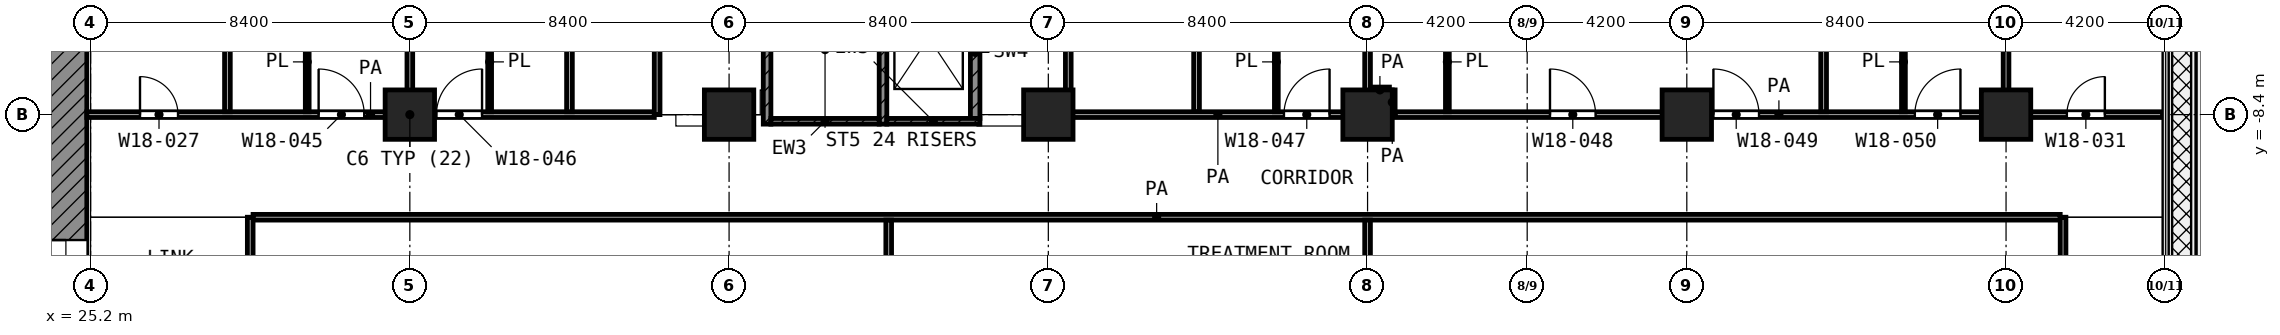
"""IFC4 building model, lengths in metres.
Left out: names, types, materials, properties, quantities, classifications, styles, units other than length and angle.
Written with IfcOpenShell. Run it as: python <this file> out.ifc"""

import sys

from ifc_helpers import new_model, si_unit, direction, frame, frame_2d, origin, origin_2d, place, context, subcontext, project, spatial, rectangle, extrude, element, fill, save


model = new_model("IFC4")
c1 = context("Model", 3, precision=1e-05, world=origin(), true_north=direction((0.0, 1.0)))
c2 = subcontext(c1, "Body", "Model", "MODEL_VIEW")
j1 = project(units=[si_unit("LENGTHUNIT", "METRE"), si_unit("PLANEANGLEUNIT", "RADIAN")], contexts=[c1])
p1 = place(None, origin())
s1 = spatial("IfcSite", under=j1, at=p1, CompositionType="ELEMENT")
p2 = place(p1, origin())
s2 = spatial("IfcBuilding", under=s1, at=p2, CompositionType="ELEMENT")
p3 = place(p2, frame((0.0, 0.0, 81.2)))
s3 = spatial("IfcBuildingStorey", under=s2, at=p3, CompositionType="ELEMENT", Elevation=81.2)
for number, where, z_axis, x_axis in (
    (1, (33.6, -8.4, 0.0), (0.0, 0.0, 1.0), (1.0, 0.0, 0.0)),
    (2, (42.0, -8.4, 0.0), (0.0, 0.0, 1.0), (1.0, 0.0, 0.0)),
    (3, (50.4, -8.4, 0.0), (0.0, 0.0, 1.0), (1.0, 0.0, 0.0)),
    (4, (58.8, -8.4, 0.0), (0.0, 0.0, 1.0), (1.0, 0.0, 0.0)),
    (5, (67.2, -8.4, 0.0), (0.0, 0.0, 1.0), (1.0, 0.0, 0.0)),
    (6, (75.6, -8.4, 0.0), (0.0, 0.0, 1.0), (1.0, 0.0, 0.0)),
):
    element("IfcColumn", number, at=place(p3, frame(where, z_axis=z_axis, x_axis=x_axis)), inside=s3, PredefinedType="COLUMN", context=c2, shape_type="SweptSolid", body=[
        extrude(rectangle(XDim=1.3, YDim=1.3, at=origin_2d()), origin(), (0.0, 0.0, 1.0), 4.2),
    ])
p4 = place(p3, frame((24.55, -24.0, 0.0), z_axis=(0.0, 0.0, 1.0), x_axis=(0.0, 1.0, 0.0)))
e7 = element("IfcWall", 7, at=p4, inside=s3, PredefinedType="SHEAR", context=c2, shape_type="SweptSolid", body=[
    extrude(rectangle(XDim=18.6, YDim=1.1, at=frame_2d((9.3, 0.0))), origin(), (0.0, 0.0, 1.0), 3.9),
])
p5 = place(p4, frame((10.5, 0.0, 0.0)))
e8 = element("IfcOpeningElement", 8, at=p5, cuts=e7, PredefinedType="OPENING", context=c2, shape_type="SweptSolid", body=[
    extrude(rectangle(XDim=1.8, YDim=2.1, at=frame_2d((0.9, 1.05))), frame((0.0, 0.56, 0.0), z_axis=(0.0, -1.0, 0.0), x_axis=(1.0, 0.0, 0.0)), (0.0, 0.0, 1.0), 1.12),
])
p6 = place(p3, frame((43.0, -8.65, 0.0), z_axis=(0.0, 0.0, 1.0), x_axis=(0.0, 1.0, 0.0)))
e9 = element("IfcWall", 9, at=p6, inside=s3, PredefinedType="SHEAR", context=c2, shape_type="SweptSolid", body=[
    extrude(rectangle(XDim=8.35, YDim=0.2, at=frame_2d((4.175, 0.0))), origin(), (0.0, 0.0, 1.0), 3.9),
])
p7 = place(p6, frame((7.0, 0.0, 0.0)))
e10 = element("IfcOpeningElement", 10, at=p7, cuts=e9, PredefinedType="OPENING", context=c2, shape_type="SweptSolid", body=[
    extrude(rectangle(XDim=1.1, YDim=2.1, at=frame_2d((0.55, 1.05))), frame((0.0, 0.11, 0.0), z_axis=(0.0, -1.0, 0.0), x_axis=(1.0, 0.0, 0.0)), (0.0, 0.0, 1.0), 0.22),
])
p8 = place(p3, frame((46.05, -8.65, 0.0), z_axis=(0.0, 0.0, 1.0), x_axis=(0.0, 1.0, 0.0)))
e11 = element("IfcWall", 11, at=p8, inside=s3, PredefinedType="SHEAR", context=c2, shape_type="SweptSolid", body=[
    extrude(rectangle(XDim=8.35, YDim=0.2, at=frame_2d((4.175, 0.0))), origin(), (0.0, 0.0, 1.0), 3.9),
])
p9 = place(p8, frame((7.0, 0.0, 0.0)))
e12 = element("IfcOpeningElement", 12, at=p9, cuts=e11, PredefinedType="OPENING", context=c2, shape_type="SweptSolid", body=[
    extrude(rectangle(XDim=1.1, YDim=2.1, at=frame_2d((0.55, 1.05))), frame((0.0, 0.11, 0.0), z_axis=(0.0, -1.0, 0.0), x_axis=(1.0, 0.0, 0.0)), (0.0, 0.0, 1.0), 0.22),
])
p10 = place(p3, frame((43.1, -8.575, 0.0), z_axis=(0.0, 0.0, 1.0), x_axis=(1.0, 0.0, 0.0)))
e13 = element("IfcWall", 13, at=p10, inside=s3, PredefinedType="SHEAR", context=c2, shape_type="SweptSolid", body=[
    extrude(rectangle(XDim=2.85, YDim=0.15, at=frame_2d((1.425, 0.0))), origin(), (0.0, 0.0, 1.0), 3.9),
])
p11 = place(p3, frame((46.15, -8.575, 0.0), z_axis=(0.0, 0.0, 1.0), x_axis=(1.0, 0.0, 0.0)))
e14 = element("IfcWall", 14, at=p11, inside=s3, PredefinedType="SHEAR", context=c2, shape_type="SweptSolid", body=[
    extrude(rectangle(XDim=2.45, YDim=0.15, at=frame_2d((1.225, 0.0))), origin(), (0.0, 0.0, 1.0), 3.9),
])
p12 = place(p3, frame((48.475, -8.5, 0.0), z_axis=(0.0, 0.0, 1.0), x_axis=(0.0, 1.0, 0.0)))
e15 = element("IfcWall", 15, at=p12, inside=s3, PredefinedType="SHEAR", context=c2, shape_type="SweptSolid", body=[
    extrude(rectangle(XDim=3.475, YDim=0.25, at=frame_2d((1.738, 0.0))), origin(), (0.0, 0.0, 1.0), 3.9),
])
for number, where, z_axis, x_axis in (
    (16, (30.9, -8.325, 0.0), (0.0, 0.0, 1.0), (0.0, 1.0, 0.0)),
    (17, (35.7, -8.325, 0.0), (0.0, 0.0, 1.0), (0.0, 1.0, 0.0)),
    (18, (56.4, -8.325, 0.0), (0.0, 0.0, 1.0), (0.0, 1.0, 0.0)),
):
    element("IfcWall", number, at=place(p3, frame(where, z_axis=z_axis, x_axis=x_axis)), inside=s3, PredefinedType="PARTITIONING", context=c2, shape_type="SweptSolid", body=[
        extrude(rectangle(XDim=2.625, YDim=0.1, at=frame_2d((1.312, 0.0))), origin(), (0.0, 0.0, 1.0), 3.9),
    ])
p13 = place(p3, frame((60.9, -8.325, 0.0), z_axis=(0.0, 0.0, 1.0), x_axis=(0.0, 1.0, 0.0)))
e19 = element("IfcWall", 19, at=p13, inside=s3, PredefinedType="PARTITIONING", context=c2, shape_type="SweptSolid", body=[
    extrude(rectangle(XDim=2.624, YDim=0.1, at=frame_2d((1.312, 0.0))), origin(), (0.0, 0.0, 1.0), 3.9),
])
p14 = place(p3, frame((72.9, -8.325, 0.0), z_axis=(0.0, 0.0, 1.0), x_axis=(0.0, 1.0, 0.0)))
e20 = element("IfcWall", 20, at=p14, inside=s3, PredefinedType="PARTITIONING", context=c2, shape_type="SweptSolid", body=[
    extrude(rectangle(XDim=2.625, YDim=0.1, at=frame_2d((1.312, 0.0))), origin(), (0.0, 0.0, 1.0), 3.9),
])
p15 = place(p3, frame((29.475, -11.1, 0.0), z_axis=(0.0, 0.0, 1.0), x_axis=(1.0, 0.0, 0.0)))
e21 = element("IfcWall", 21, at=p15, inside=s3, PredefinedType="PARTITIONING", context=c2, shape_type="SweptSolid", body=[
    extrude(rectangle(XDim=47.55, YDim=0.15, at=frame_2d((23.775, 0.0))), origin(), (0.0, 0.0, 1.0), 3.9),
])
p16 = place(p3, frame((25.1, -8.4, 0.0), z_axis=(0.0, 0.0, 1.0), x_axis=(1.0, 0.0, 0.0)))
e22 = element("IfcWall", 22, at=p16, inside=s3, PredefinedType="PARTITIONING", context=c2, shape_type="SweptSolid", body=[
    extrude(rectangle(XDim=14.932, YDim=0.15, at=frame_2d((7.466, 0.0))), origin(), (0.0, 0.0, 1.0), 3.9),
])
p17 = place(p16, frame((1.4, 0.0, 0.0)))
e23 = element("IfcOpeningElement", 23, at=p17, cuts=e22, PredefinedType="OPENING", context=c2, shape_type="SweptSolid", body=[
    extrude(rectangle(XDim=1.0, YDim=2.1, at=frame_2d((0.5, 1.05))), frame((0.0, 0.085, 0.0), z_axis=(0.0, -1.0, 0.0), x_axis=(1.0, 0.0, 0.0)), (0.0, 0.0, 1.0), 0.17),
])
p18 = place(p16, frame((6.1, 0.0, 0.0)))
e24 = element("IfcOpeningElement", 24, at=p18, cuts=e22, PredefinedType="OPENING", context=c2, shape_type="SweptSolid", body=[
    extrude(rectangle(XDim=1.2, YDim=2.1, at=frame_2d((0.6, 1.05))), frame((0.0, 0.085, 0.0), z_axis=(0.0, -1.0, 0.0), x_axis=(1.0, 0.0, 0.0)), (0.0, 0.0, 1.0), 0.17),
])
p19 = place(p16, frame((9.2, 0.0, 0.0)))
e25 = element("IfcOpeningElement", 25, at=p19, cuts=e22, PredefinedType="OPENING", context=c2, shape_type="SweptSolid", body=[
    extrude(rectangle(XDim=1.2, YDim=2.1, at=frame_2d((0.6, 1.05))), frame((0.0, 0.085, 0.0), z_axis=(0.0, -1.0, 0.0), x_axis=(1.0, 0.0, 0.0)), (0.0, 0.0, 1.0), 0.17),
])
p20 = place(p3, frame((51.0, -8.4, 0.0), z_axis=(0.0, 0.0, 1.0), x_axis=(1.0, 0.0, 0.0)))
e26 = element("IfcWall", 26, at=p20, inside=s3, PredefinedType="PARTITIONING", context=c2, shape_type="SweptSolid", body=[
    extrude(rectangle(XDim=7.723, YDim=0.15, at=frame_2d((3.861, 0.0))), origin(), (0.0, 0.0, 1.0), 3.9),
])
p21 = place(p20, frame((5.6, 0.0, 0.0)))
e27 = element("IfcOpeningElement", 27, at=p21, cuts=e26, PredefinedType="OPENING", context=c2, shape_type="SweptSolid", body=[
    extrude(rectangle(XDim=1.2, YDim=2.1, at=frame_2d((0.6, 1.05))), frame((0.0, 0.085, 0.0), z_axis=(0.0, -1.0, 0.0), x_axis=(1.0, 0.0, 0.0)), (0.0, 0.0, 1.0), 0.17),
])
p22 = place(p3, frame((59.527, -8.4, 0.0), z_axis=(0.0, 0.0, 1.0), x_axis=(1.0, 0.0, 0.0)))
e28 = element("IfcWall", 28, at=p22, inside=s3, PredefinedType="PARTITIONING", context=c2, shape_type="SweptSolid", body=[
    extrude(rectangle(XDim=20.193, YDim=0.15, at=frame_2d((10.096, 0.0))), origin(), (0.0, 0.0, 1.0), 3.9),
])
p23 = place(p22, frame((4.073, 0.0, 0.0)))
e29 = element("IfcOpeningElement", 29, at=p23, cuts=e28, PredefinedType="OPENING", context=c2, shape_type="SweptSolid", body=[
    extrude(rectangle(XDim=1.2, YDim=2.1, at=frame_2d((0.6, 1.05))), frame((0.0, 0.085, 0.0), z_axis=(0.0, -1.0, 0.0), x_axis=(1.0, 0.0, 0.0)), (0.0, 0.0, 1.0), 0.17),
])
p24 = place(p22, frame((8.373, 0.0, 0.0)))
e30 = element("IfcOpeningElement", 30, at=p24, cuts=e28, PredefinedType="OPENING", context=c2, shape_type="SweptSolid", body=[
    extrude(rectangle(XDim=1.2, YDim=2.1, at=frame_2d((0.6, 1.05))), frame((0.0, 0.085, 0.0), z_axis=(0.0, -1.0, 0.0), x_axis=(1.0, 0.0, 0.0)), (0.0, 0.0, 1.0), 0.17),
])
p25 = place(p22, frame((13.673, 0.0, 0.0)))
e31 = element("IfcOpeningElement", 31, at=p25, cuts=e28, PredefinedType="OPENING", context=c2, shape_type="SweptSolid", body=[
    extrude(rectangle(XDim=1.2, YDim=2.1, at=frame_2d((0.6, 1.05))), frame((0.0, 0.085, 0.0), z_axis=(0.0, -1.0, 0.0), x_axis=(1.0, 0.0, 0.0)), (0.0, 0.0, 1.0), 0.17),
])
p26 = place(p22, frame((17.673, 0.0, 0.0)))
e32 = element("IfcOpeningElement", 32, at=p26, cuts=e28, PredefinedType="OPENING", context=c2, shape_type="SweptSolid", body=[
    extrude(rectangle(XDim=1.0, YDim=2.1, at=frame_2d((0.5, 1.05))), frame((0.0, 0.085, 0.0), z_axis=(0.0, -1.0, 0.0), x_axis=(1.0, 0.0, 0.0)), (0.0, 0.0, 1.0), 0.17),
])
p27 = place(p3, frame((58.875, -7.75, 0.0), z_axis=(0.0, 0.0, 1.0), x_axis=(1.0, 0.0, 0.0)))
e33 = element("IfcWall", 33, at=p27, inside=s3, PredefinedType="PARTITIONING", context=c2, shape_type="SweptSolid", body=[
    extrude(rectangle(XDim=0.5, YDim=0.15, at=frame_2d((0.25, 0.0))), origin(), (0.0, 0.0, 1.0), 3.9),
])
p28 = place(p3, frame((28.8, -8.325, 0.0), z_axis=(0.0, 0.0, 1.0), x_axis=(0.0, 1.0, 0.0)))
e34 = element("IfcWall", 34, at=p28, inside=s3, PredefinedType="PARTITIONING", context=c2, shape_type="SweptSolid", body=[
    extrude(rectangle(XDim=8.245, YDim=0.15, at=frame_2d((4.123, 0.0))), origin(), (0.0, 0.0, 1.0), 3.9),
])
p29 = place(p3, frame((29.4, -14.1, 0.0), z_axis=(0.0, 0.0, 1.0), x_axis=(0.0, 1.0, 0.0)))
e35 = element("IfcWall", 35, at=p29, inside=s3, PredefinedType="PARTITIONING", context=c2, shape_type="SweptSolid", body=[
    extrude(rectangle(XDim=3.0, YDim=0.15, at=frame_2d((1.5, 0.0))), origin(), (0.0, 0.0, 1.0), 3.9),
])
for number, where, z_axis, x_axis in (
    (36, (33.6, -8.325, 0.0), (0.0, 0.0, 1.0), (0.0, 1.0, 0.0)),
    (37, (37.8, -8.325, 0.0), (0.0, 0.0, 1.0), (0.0, 1.0, 0.0)),
):
    element("IfcWall", number, at=place(p3, frame(where, z_axis=z_axis, x_axis=x_axis)), inside=s3, PredefinedType="PARTITIONING", context=c2, shape_type="SweptSolid", body=[
        extrude(rectangle(XDim=8.245, YDim=0.15, at=frame_2d((4.123, 0.0))), origin(), (0.0, 0.0, 1.0), 3.9),
    ])
p30 = place(p3, frame((40.107, -8.4, 0.0), z_axis=(0.0, 0.0, 1.0), x_axis=(0.0, 1.0, 0.0)))
e38 = element("IfcWall", 38, at=p30, inside=s3, PredefinedType="PARTITIONING", context=c2, shape_type="SweptSolid", body=[
    extrude(rectangle(XDim=8.048, YDim=0.15, at=frame_2d((4.024, 0.0))), origin(), (0.0, 0.0, 1.0), 3.9),
])
p31 = place(p30, frame((3.524, 0.0, 0.0)))
e39 = element("IfcOpeningElement", 39, at=p31, cuts=e38, PredefinedType="OPENING", context=c2, shape_type="SweptSolid", body=[
    extrude(rectangle(XDim=1.0, YDim=2.1, at=frame_2d((0.5, 1.05))), frame((0.0, 0.085, 0.0), z_axis=(0.0, -1.0, 0.0), x_axis=(1.0, 0.0, 0.0)), (0.0, 0.0, 1.0), 0.17),
])
p32 = place(p3, frame((46.2, -14.025, 0.0), z_axis=(0.0, 0.0, 1.0), x_axis=(0.0, 1.0, 0.0)))
e40 = element("IfcWall", 40, at=p32, inside=s3, PredefinedType="PARTITIONING", context=c2, shape_type="SweptSolid", body=[
    extrude(rectangle(XDim=2.85, YDim=0.15, at=frame_2d((1.425, 0.0))), origin(), (0.0, 0.0, 1.0), 3.9),
])
p33 = place(p3, frame((50.925, -8.4, 0.0), z_axis=(0.0, 0.0, 1.0), x_axis=(0.0, 1.0, 0.0)))
e41 = element("IfcWall", 41, at=p33, inside=s3, PredefinedType="PARTITIONING", context=c2, shape_type="SweptSolid", body=[
    extrude(rectangle(XDim=6.548, YDim=0.15, at=frame_2d((3.274, 0.0))), origin(), (0.0, 0.0, 1.0), 3.9),
])
p34 = place(p33, frame((2.774, 0.0, 0.0)))
e42 = element("IfcOpeningElement", 42, at=p34, cuts=e41, PredefinedType="OPENING", context=c2, shape_type="SweptSolid", body=[
    extrude(rectangle(XDim=1.0, YDim=2.1, at=frame_2d((0.5, 1.05))), frame((0.0, 0.085, 0.0), z_axis=(0.0, -1.0, 0.0), x_axis=(1.0, 0.0, 0.0)), (0.0, 0.0, 1.0), 0.17),
])
p35 = place(p3, frame((54.3, -8.325, 0.0), z_axis=(0.0, 0.0, 1.0), x_axis=(0.0, 1.0, 0.0)))
e43 = element("IfcWall", 43, at=p35, inside=s3, PredefinedType="PARTITIONING", context=c2, shape_type="SweptSolid", body=[
    extrude(rectangle(XDim=8.245, YDim=0.15, at=frame_2d((4.123, 0.0))), origin(), (0.0, 0.0, 1.0), 3.9),
])
p36 = place(p3, frame((58.8, -14.025, 0.0), z_axis=(0.0, 0.0, 1.0), x_axis=(0.0, 1.0, 0.0)))
e44 = element("IfcWall", 44, at=p36, inside=s3, PredefinedType="PARTITIONING", context=c2, shape_type="SweptSolid", body=[
    extrude(rectangle(XDim=2.85, YDim=0.15, at=frame_2d((1.425, 0.0))), origin(), (0.0, 0.0, 1.0), 3.9),
])
p37 = place(p3, frame((58.8, -8.398, 0.0), z_axis=(0.0, 0.0, 1.0), x_axis=(0.0, 1.0, 0.0)))
e45 = element("IfcWall", 45, at=p37, inside=s3, PredefinedType="PARTITIONING", context=c2, shape_type="SweptSolid", body=[
    extrude(rectangle(XDim=8.318, YDim=0.15, at=frame_2d((4.159, 0.0))), origin(), (0.0, 0.0, 1.0), 3.9),
])
p38 = place(p3, frame((59.45, -8.398, 0.0), z_axis=(0.0, 0.0, 1.0), x_axis=(0.0, 1.0, 0.0)))
e46 = element("IfcWall", 46, at=p38, inside=s3, PredefinedType="PARTITIONING", context=c2, shape_type="SweptSolid", body=[
    extrude(rectangle(XDim=0.648, YDim=0.15, at=frame_2d((0.324, 0.0))), origin(), (0.0, 0.0, 1.0), 3.9),
])
p39 = place(p3, frame((70.8, -8.325, 0.0), z_axis=(0.0, 0.0, 1.0), x_axis=(0.0, 1.0, 0.0)))
e47 = element("IfcWall", 47, at=p39, inside=s3, PredefinedType="PARTITIONING", context=c2, shape_type="SweptSolid", body=[
    extrude(rectangle(XDim=8.245, YDim=0.15, at=frame_2d((4.123, 0.0))), origin(), (0.0, 0.0, 1.0), 3.9),
])
p40 = place(p3, frame((75.6, -8.325, 0.0), z_axis=(0.0, 0.0, 1.0), x_axis=(0.0, 1.0, 0.0)))
e48 = element("IfcWall", 48, at=p40, inside=s3, PredefinedType="PARTITIONING", context=c2, shape_type="SweptSolid", body=[
    extrude(rectangle(XDim=6.412, YDim=0.15, at=frame_2d((3.206, 0.0))), origin(), (0.0, 0.0, 1.0), 3.9),
])
p41 = place(p3, frame((77.1, -14.1, 0.0), z_axis=(0.0, 0.0, 1.0), x_axis=(0.0, 1.0, 0.0)))
e49 = element("IfcWall", 49, at=p41, inside=s3, PredefinedType="PARTITIONING", context=c2, shape_type="SweptSolid", body=[
    extrude(rectangle(XDim=3.0, YDim=0.15, at=frame_2d((1.5, 0.0))), origin(), (0.0, 0.0, 1.0), 3.9),
])
p42 = place(p5, origin())
e50 = element("IfcDoor", 50, at=p42, inside=s3, OperationType="DOUBLE_DOOR_SINGLE_SWING", PredefinedType="DOOR", context=c2, shape_type="SweptSolid", body=[
    extrude(rectangle(XDim=1.8, YDim=2.1, at=frame_2d((0.9, 1.05))), frame((0.0, 0.025, 0.0), z_axis=(0.0, -1.0, 0.0), x_axis=(1.0, 0.0, 0.0)), (0.0, 0.0, 1.0), 0.05),
])
fill(e8, e50)
p43 = place(p17, origin())
e51 = element("IfcDoor", 51, at=p43, inside=s3, OperationType="SINGLE_SWING_LEFT", PredefinedType="DOOR", context=c2, shape_type="SweptSolid", body=[
    extrude(rectangle(XDim=1.0, YDim=2.1, at=frame_2d((0.5, 1.05))), frame((0.0, 0.025, 0.0), z_axis=(0.0, -1.0, 0.0), x_axis=(1.0, 0.0, 0.0)), (0.0, 0.0, 1.0), 0.05),
])
fill(e23, e51)
p44 = place(p18, origin())
e52 = element("IfcDoor", 52, at=p44, inside=s3, OperationType="SINGLE_SWING_LEFT", PredefinedType="DOOR", context=c2, shape_type="SweptSolid", body=[
    extrude(rectangle(XDim=1.2, YDim=2.1, at=frame_2d((0.6, 1.05))), frame((0.0, 0.025, 0.0), z_axis=(0.0, -1.0, 0.0), x_axis=(1.0, 0.0, 0.0)), (0.0, 0.0, 1.0), 0.05),
])
fill(e24, e52)
p45 = place(p19, origin())
e53 = element("IfcDoor", 53, at=p45, inside=s3, OperationType="SINGLE_SWING_RIGHT", PredefinedType="DOOR", context=c2, shape_type="SweptSolid", body=[
    extrude(rectangle(XDim=1.2, YDim=2.1, at=frame_2d((0.6, 1.05))), frame((0.0, 0.025, 0.0), z_axis=(0.0, -1.0, 0.0), x_axis=(1.0, 0.0, 0.0)), (0.0, 0.0, 1.0), 0.05),
])
fill(e25, e53)
p46 = place(p21, origin())
e54 = element("IfcDoor", 54, at=p46, inside=s3, OperationType="SINGLE_SWING_RIGHT", PredefinedType="DOOR", context=c2, shape_type="SweptSolid", body=[
    extrude(rectangle(XDim=1.2, YDim=2.1, at=frame_2d((0.6, 1.05))), frame((0.0, 0.025, 0.0), z_axis=(0.0, -1.0, 0.0), x_axis=(1.0, 0.0, 0.0)), (0.0, 0.0, 1.0), 0.05),
])
fill(e27, e54)
p47 = place(p23, origin())
e55 = element("IfcDoor", 55, at=p47, inside=s3, OperationType="SINGLE_SWING_LEFT", PredefinedType="DOOR", context=c2, shape_type="SweptSolid", body=[
    extrude(rectangle(XDim=1.2, YDim=2.1, at=frame_2d((0.6, 1.05))), frame((0.0, 0.025, 0.0), z_axis=(0.0, -1.0, 0.0), x_axis=(1.0, 0.0, 0.0)), (0.0, 0.0, 1.0), 0.05),
])
fill(e29, e55)
p48 = place(p24, origin())
e56 = element("IfcDoor", 56, at=p48, inside=s3, OperationType="SINGLE_SWING_LEFT", PredefinedType="DOOR", context=c2, shape_type="SweptSolid", body=[
    extrude(rectangle(XDim=1.2, YDim=2.1, at=frame_2d((0.6, 1.05))), frame((0.0, 0.025, 0.0), z_axis=(0.0, -1.0, 0.0), x_axis=(1.0, 0.0, 0.0)), (0.0, 0.0, 1.0), 0.05),
])
fill(e30, e56)
p49 = place(p25, origin())
e57 = element("IfcDoor", 57, at=p49, inside=s3, OperationType="SINGLE_SWING_RIGHT", PredefinedType="DOOR", context=c2, shape_type="SweptSolid", body=[
    extrude(rectangle(XDim=1.2, YDim=2.1, at=frame_2d((0.6, 1.05))), frame((0.0, 0.025, 0.0), z_axis=(0.0, -1.0, 0.0), x_axis=(1.0, 0.0, 0.0)), (0.0, 0.0, 1.0), 0.05),
])
fill(e31, e57)
p50 = place(p26, origin())
e58 = element("IfcDoor", 58, at=p50, inside=s3, OperationType="SINGLE_SWING_RIGHT", PredefinedType="DOOR", context=c2, shape_type="SweptSolid", body=[
    extrude(rectangle(XDim=1.0, YDim=2.1, at=frame_2d((0.5, 1.05))), frame((0.0, 0.025, 0.0), z_axis=(0.0, -1.0, 0.0), x_axis=(1.0, 0.0, 0.0)), (0.0, 0.0, 1.0), 0.05),
])
fill(e32, e58)
save(model, sys.argv[1])
